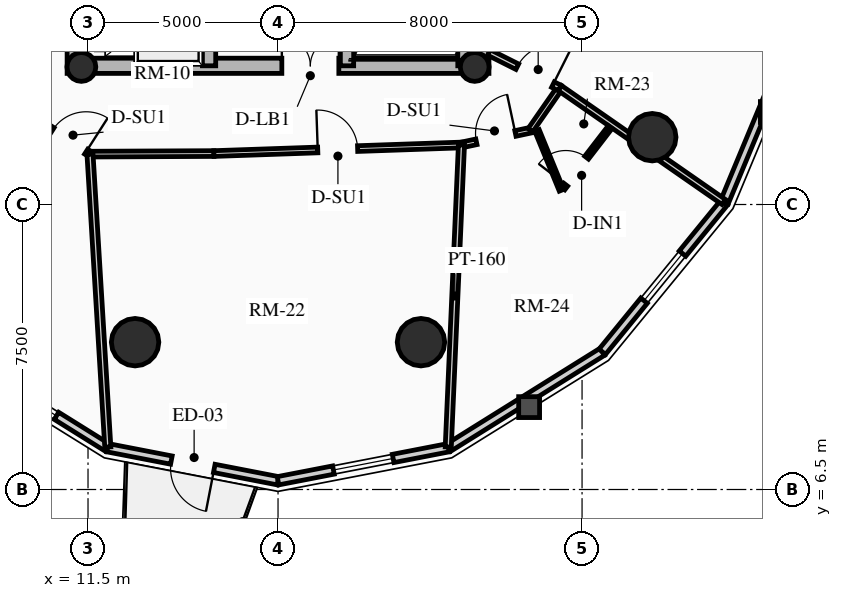
"""IFC4 building model, lengths in metres.
Left out: names, types, materials, properties, quantities, classifications, styles, units other than length and angle.
Written with IfcOpenShell. Run it as: python <this file> out.ifc"""

import sys

from ifc_helpers import new_model, si_unit, direction, frame, frame_2d, origin, origin_2d, place, context, subcontext, project, spatial, rectangle, circle, hollow_circle, extrude, source, transform, mapped, element, fill, save


model = new_model("IFC4")
c1 = context("Model", 3, precision=1e-05, world=origin(), true_north=direction((0.0, 1.0)))
c2 = subcontext(c1, "Body", "Model", "MODEL_VIEW")
j1 = project(units=[si_unit("LENGTHUNIT", "METRE"), si_unit("PLANEANGLEUNIT", "RADIAN")], contexts=[c1])
p1 = place(None, origin())
s1 = spatial("IfcSite", under=j1, at=p1, CompositionType="ELEMENT")
p2 = place(p1, origin())
s2 = spatial("IfcBuilding", under=s1, at=p2, CompositionType="ELEMENT")
p3 = place(p2, frame((0.0, 0.0, 154.51)))
s3 = spatial("IfcBuildingStorey", under=s2, at=p3, CompositionType="ELEMENT", Elevation=154.51)
for number, where, z_axis, x_axis in (
    (1, (11.15, 17.45, 0.0), (0.0, 0.0, 1.0), (0.0, 1.0, 0.0)),
    (2, (21.85, 17.45, 0.0), (0.0, 0.0, 1.0), (0.0, 1.0, 0.0)),
):
    element("IfcWall", number, at=place(p3, frame(where, z_axis=z_axis, x_axis=x_axis)), inside=s3, PredefinedType="SHEAR", context=c2, shape_type="SweptSolid", body=[
        extrude(rectangle(XDim=14.1, YDim=0.4, at=frame_2d((7.05, 0.0))), origin(), (0.0, 0.0, 1.0), 2.91),
    ])
p4 = place(p3, frame((11.15, 17.65, 0.0), z_axis=(0.0, 0.0, 1.0), x_axis=(1.0, 0.0, 0.0)))
e3 = element("IfcWall", 3, at=p4, inside=s3, PredefinedType="SHEAR", context=c2, shape_type="SweptSolid", body=[
    extrude(rectangle(XDim=10.7, YDim=0.4, at=frame_2d((5.35, 0.0))), origin(), (0.0, 0.0, 1.0), 2.91),
])
m1 = source(origin(), c2, "Body", "SweptSolid", [
    extrude(rectangle(XDim=1.5, YDim=2.02, at=frame_2d((0.75, 1.01))), frame((0.0, 0.21, 0.0), z_axis=(0.0, -1.0, 0.0), x_axis=(1.0, 0.0, 0.0)), (0.0, 0.0, 1.0), 0.42),
])
p5 = place(p4, frame((5.45, 0.0, 0.0)))
e4 = element("IfcOpeningElement", 4, at=p5, cuts=e3, PredefinedType="OPENING", context=c2, shape_type="MappedRepresentation", body=[
    mapped(m1, transform((0.0, 0.0, 0.0), x_axis=(1.0, 0.0, 0.0), y_axis=(0.0, 1.0, 0.0), z_axis=(0.0, 0.0, 1.0), scale=1.0)),
])
p6 = place(p3, frame((14.685, 17.65, 0.0), z_axis=(0.0, 0.0, 1.0), x_axis=(0.0, 1.0, 0.0)))
e5 = element("IfcWall", 5, at=p6, inside=s3, PredefinedType="SHEAR", context=c2, shape_type="SweptSolid", body=[
    extrude(rectangle(XDim=13.7, YDim=0.35, at=frame_2d((6.85, 0.0))), origin(), (0.0, 0.0, 1.0), 2.91),
])
m2 = source(origin(), c2, "Body", "SweptSolid", [
    extrude(rectangle(XDim=1.1, YDim=2.015, at=frame_2d((0.55, 1.007))), frame((0.0, 0.185, 0.0), z_axis=(0.0, -1.0, 0.0), x_axis=(1.0, 0.0, 0.0)), (0.0, 0.0, 1.0), 0.37),
])
p7 = place(p6, frame((4.85, 0.0, 0.0)))
e6 = element("IfcOpeningElement", 6, at=p7, cuts=e5, PredefinedType="OPENING", context=c2, shape_type="MappedRepresentation", body=[
    mapped(m2, transform((0.0, 0.0, 0.0), x_axis=(1.0, 0.0, 0.0), y_axis=(0.0, 1.0, 0.0), z_axis=(0.0, 0.0, 1.0), scale=1.0)),
])
p8 = place(p6, frame((0.625, 0.0, 0.0)))
e7 = element("IfcOpeningElement", 7, at=p8, cuts=e5, PredefinedType="OPENING", context=c2, shape_type="MappedRepresentation", body=[
    mapped(m2, transform((0.0, 0.0, 0.0), x_axis=(1.0, 0.0, 0.0), y_axis=(0.0, 1.0, 0.0), z_axis=(0.0, 0.0, 1.0), scale=1.0)),
])
p9 = place(p6, frame((2.625, 0.0, 0.0)))
e8 = element("IfcOpeningElement", 8, at=p9, cuts=e5, PredefinedType="OPENING", context=c2, shape_type="MappedRepresentation", body=[
    mapped(m2, transform((0.0, 0.0, 0.0), x_axis=(1.0, 0.0, 0.0), y_axis=(0.0, 1.0, 0.0), z_axis=(0.0, 0.0, 1.0), scale=1.0)),
])
m3 = source(origin(), c2, "Body", "SweptSolid", [
    extrude(rectangle(XDim=1.15, YDim=2.02, at=frame_2d((0.575, 1.01))), frame((0.0, 0.185, 0.0), z_axis=(0.0, -1.0, 0.0), x_axis=(1.0, 0.0, 0.0)), (0.0, 0.0, 1.0), 0.37),
])
p10 = place(p6, frame((7.27, 0.0, 0.0)))
e9 = element("IfcOpeningElement", 9, at=p10, cuts=e5, PredefinedType="OPENING", context=c2, shape_type="MappedRepresentation", body=[
    mapped(m3, transform((0.0, 0.0, 0.0), x_axis=(1.0, 0.0, 0.0), y_axis=(0.0, 1.0, 0.0), z_axis=(0.0, 0.0, 1.0), scale=1.0)),
])
p11 = place(p3, frame((18.315, 17.65, 0.0), z_axis=(0.0, 0.0, 1.0), x_axis=(0.0, 1.0, 0.0)))
e10 = element("IfcWall", 10, at=p11, inside=s3, PredefinedType="SHEAR", context=c2, shape_type="SweptSolid", body=[
    extrude(rectangle(XDim=9.6, YDim=0.35, at=frame_2d((4.8, 0.0))), origin(), (0.0, 0.0, 1.0), 2.91),
])
p12 = place(p11, frame((5.28, 0.0, 0.0)))
e11 = element("IfcOpeningElement", 11, at=p12, cuts=e10, PredefinedType="OPENING", context=c2, shape_type="MappedRepresentation", body=[
    mapped(m3, transform((0.0, 0.0, 0.0), x_axis=(1.0, 0.0, 0.0), y_axis=(0.0, 1.0, 0.0), z_axis=(0.0, 0.0, 1.0), scale=1.0)),
])
p13 = place(p3, frame((21.405, 17.65, 0.0), z_axis=(0.0, 0.0, 1.0), x_axis=(0.0, 1.0, 0.0)))
e12 = element("IfcWall", 12, at=p13, inside=s3, PredefinedType="SHEAR", context=c2, shape_type="SweptSolid", body=[
    extrude(rectangle(XDim=6.695, YDim=0.35, at=frame_2d((3.348, 0.0))), origin(), (0.0, 0.0, 1.0), 2.91),
])
for number, where, z_axis, x_axis in (
    (13, (11.325, 17.62, 0.0), (0.0, 0.0, 1.0), (1.0, 0.0, 0.0)),
    (14, (21.675, 17.62, 0.0), (0.0, 0.0, 1.0), (1.0, 0.0, 0.0)),
):
    element("IfcColumn", number, at=place(p3, frame(where, z_axis=z_axis, x_axis=x_axis)), inside=s3, PredefinedType="COLUMN", context=c2, shape_type="SweptSolid", body=[
        extrude(hollow_circle(Radius=0.38, WallThickness=0.032, at=origin_2d()), origin(), (0.0, 0.0, 1.0), 2.91),
    ])
for number, where, z_axis, x_axis in (
    (15, (12.739, 10.377, 0.0), (0.0, 0.0, 1.0), (1.0, 0.0, 0.0)),
    (16, (20.261, 10.377, 0.0), (0.0, 0.0, 1.0), (1.0, 0.0, 0.0)),
    (17, (26.347, 15.771, 0.0), (0.0, 0.0, 1.0), (1.0, 0.0, 0.0)),
):
    element("IfcColumn", number, at=place(p3, frame(where, z_axis=z_axis, x_axis=x_axis)), inside=s3, PredefinedType="USERDEFINED", context=c2, shape_type="SweptSolid", body=[
        extrude(circle(Radius=0.625, at=origin_2d()), origin(), (0.0, 0.0, 1.0), 2.91),
    ])
p14 = place(p3, frame((12.015, 7.6, 0.0), z_axis=(0.0, 0.0, 1.0), x_axis=(-0.848452391194, 0.529271707044, 0.0)))
e18 = element("IfcWall", 18, at=p14, inside=s3, PredefinedType="SOLIDWALL", context=c2, shape_type="SweptSolid", body=[
    extrude(rectangle(XDim=4.769, YDim=0.22, at=frame_2d((2.385, 0.0))), origin(), (0.0, 0.0, 1.0), 2.245),
])
m4 = source(origin(), c2, "Body", "SweptSolid", [
    extrude(rectangle(XDim=1.6, YDim=1.3, at=frame_2d((0.8, 0.65))), frame((0.0, 0.12, 0.0), z_axis=(0.0, -1.0, 0.0), x_axis=(1.0, 0.0, 0.0)), (0.0, 0.0, 1.0), 0.24),
])
p15 = place(p14, frame((1.585, 0.0, 0.65)))
e19 = element("IfcOpeningElement", 19, at=p15, cuts=e18, PredefinedType="OPENING", context=c2, shape_type="MappedRepresentation", body=[
    mapped(m4, transform((0.0, 0.0, 0.0), x_axis=(1.0, 0.0, 0.0), y_axis=(0.0, 1.0, 0.0), z_axis=(0.0, 0.0, 1.0), scale=1.0)),
])
p16 = place(p3, frame((16.5, 6.73, 0.0), z_axis=(0.0, 0.0, 1.0), x_axis=(-0.981718699963, 0.190337579429, 0.0)))
e20 = element("IfcWall", 20, at=p16, inside=s3, PredefinedType="SOLIDWALL", context=c2, shape_type="SweptSolid", body=[
    extrude(rectangle(XDim=4.569, YDim=0.22, at=frame_2d((2.284, 0.0))), origin(), (0.0, 0.0, 1.0), 2.245),
])
m5 = source(origin(), c2, "Body", "SweptSolid", [
    extrude(rectangle(XDim=1.15, YDim=2.005, at=frame_2d((0.575, 1.002))), frame((0.0, 0.12, 0.0), z_axis=(0.0, -1.0, 0.0), x_axis=(1.0, 0.0, 0.0)), (0.0, 0.0, 1.0), 0.24),
])
p17 = place(p16, frame((1.709, 0.0, 0.0)))
e21 = element("IfcOpeningElement", 21, at=p17, cuts=e20, PredefinedType="OPENING", context=c2, shape_type="MappedRepresentation", body=[
    mapped(m5, transform((0.0, 0.0, 0.0), x_axis=(1.0, 0.0, 0.0), y_axis=(0.0, 1.0, 0.0), z_axis=(0.0, 0.0, 1.0), scale=1.0)),
])
p18 = place(p3, frame((20.985, 7.6, 0.0), z_axis=(0.0, 0.0, 1.0), x_axis=(-0.981718699963, -0.190337579429, 0.0)))
e22 = element("IfcWall", 22, at=p18, inside=s3, PredefinedType="SOLIDWALL", context=c2, shape_type="SweptSolid", body=[
    extrude(rectangle(XDim=4.569, YDim=0.22, at=frame_2d((2.284, 0.0))), origin(), (0.0, 0.0, 1.0), 2.245),
])
p19 = place(p18, frame((1.484, 0.0, 0.65)))
e23 = element("IfcOpeningElement", 23, at=p19, cuts=e22, PredefinedType="OPENING", context=c2, shape_type="MappedRepresentation", body=[
    mapped(m4, transform((0.0, 0.0, 0.0), x_axis=(1.0, 0.0, 0.0), y_axis=(0.0, 1.0, 0.0), z_axis=(0.0, 0.0, 1.0), scale=1.0)),
])
p20 = place(p3, frame((25.032, 10.124, 0.0), z_axis=(0.0, 0.0, 1.0), x_axis=(-0.848452391194, -0.529271707044, 0.0)))
e24 = element("IfcWall", 24, at=p20, inside=s3, PredefinedType="SOLIDWALL", context=c2, shape_type="SweptSolid", body=[
    extrude(rectangle(XDim=4.769, YDim=0.22, at=frame_2d((2.385, 0.0))), origin(), (0.0, 0.0, 1.0), 2.245),
])
p21 = place(p3, frame((28.243, 14.055, 0.0), z_axis=(0.0, 0.0, 1.0), x_axis=(-0.632598524901, -0.774479894053, 0.0)))
e25 = element("IfcWall", 25, at=p21, inside=s3, PredefinedType="SOLIDWALL", context=c2, shape_type="SweptSolid", body=[
    extrude(rectangle(XDim=5.076, YDim=0.22, at=frame_2d((2.538, 0.0))), origin(), (0.0, 0.0, 1.0), 2.245),
])
p22 = place(p21, frame((1.738, 0.0, 0.65)))
e26 = element("IfcOpeningElement", 26, at=p22, cuts=e25, PredefinedType="OPENING", context=c2, shape_type="MappedRepresentation", body=[
    mapped(m4, transform((0.0, 0.0, 0.0), x_axis=(1.0, 0.0, 0.0), y_axis=(0.0, 1.0, 0.0), z_axis=(0.0, 0.0, 1.0), scale=1.0)),
])
p23 = place(p3, frame((30.305, 19.009, 0.0), z_axis=(0.0, 0.0, 1.0), x_axis=(-0.384259959969, -0.923224936386, 0.0)))
e27 = element("IfcWall", 27, at=p23, inside=s3, PredefinedType="SOLIDWALL", context=c2, shape_type="SweptSolid", body=[
    extrude(rectangle(XDim=5.365, YDim=0.22, at=frame_2d((2.683, 0.0))), origin(), (0.0, 0.0, 1.0), 2.245),
])
p24 = place(p3, frame((10.237, 16.168, 0.0), z_axis=(0.0, 0.0, 1.0), x_axis=(0.842061223587, -0.53938195718, 0.0)))
e28 = element("IfcWall", 28, at=p24, inside=s3, PredefinedType="PARTITIONING", context=c2, shape_type="SweptSolid", body=[
    extrude(rectangle(XDim=1.562, YDim=0.15, at=frame_2d((0.781, 0.0))), origin(), (0.0, 0.0, 1.0), 2.245),
])
m6 = source(origin(), c2, "Body", "SweptSolid", [
    extrude(rectangle(XDim=1.05, YDim=2.015, at=frame_2d((0.525, 1.007))), frame((0.0, 0.085, 0.0), z_axis=(0.0, -1.0, 0.0), x_axis=(1.0, 0.0, 0.0)), (0.0, 0.0, 1.0), 0.17),
])
p25 = place(p24, frame((0.392, 0.0, 0.0)))
e29 = element("IfcOpeningElement", 29, at=p25, cuts=e28, PredefinedType="OPENING", context=c2, shape_type="MappedRepresentation", body=[
    mapped(m6, transform((0.0, 0.0, 0.0), x_axis=(1.0, 0.0, 0.0), y_axis=(0.0, 1.0, 0.0), z_axis=(0.0, 0.0, 1.0), scale=1.0)),
])
p26 = place(p3, frame((11.552, 15.326, 0.0), z_axis=(0.0, 0.0, 1.0), x_axis=(0.999989573465, 0.004566504266, 0.0)))
e30 = element("IfcWall", 30, at=p26, inside=s3, PredefinedType="PARTITIONING", context=c2, shape_type="SweptSolid", body=[
    extrude(rectangle(XDim=3.261, YDim=0.15, at=frame_2d((1.631, 0.0))), origin(), (0.0, 0.0, 1.0), 2.245),
])
p27 = place(p3, frame((14.813, 15.341, 0.0), z_axis=(0.0, 0.0, 1.0), x_axis=(0.999402077819, 0.034575813105, 0.0)))
e31 = element("IfcWall", 31, at=p27, inside=s3, PredefinedType="PARTITIONING", context=c2, shape_type="SweptSolid", body=[
    extrude(rectangle(XDim=6.517, YDim=0.15, at=frame_2d((3.259, 0.0))), origin(), (0.0, 0.0, 1.0), 2.245),
])
p28 = place(p27, frame((2.734, 0.0, 0.0)))
e32 = element("IfcOpeningElement", 32, at=p28, cuts=e31, PredefinedType="OPENING", context=c2, shape_type="MappedRepresentation", body=[
    mapped(m6, transform((0.0, 0.0, 0.0), x_axis=(1.0, 0.0, 0.0), y_axis=(0.0, 1.0, 0.0), z_axis=(0.0, 0.0, 1.0), scale=1.0)),
])
p29 = place(p3, frame((21.326, 15.566, 0.0), z_axis=(0.0, 0.0, 1.0), x_axis=(0.977908238308, 0.209034632176, 0.0)))
e33 = element("IfcWall", 33, at=p29, inside=s3, PredefinedType="PARTITIONING", context=c2, shape_type="SweptSolid", body=[
    extrude(rectangle(XDim=1.855, YDim=0.15, at=frame_2d((0.927, 0.0))), origin(), (0.0, 0.0, 1.0), 2.245),
])
p30 = place(p29, frame((0.402, 0.0, 0.0)))
e34 = element("IfcOpeningElement", 34, at=p30, cuts=e33, PredefinedType="OPENING", context=c2, shape_type="MappedRepresentation", body=[
    mapped(m6, transform((0.0, 0.0, 0.0), x_axis=(1.0, 0.0, 0.0), y_axis=(0.0, 1.0, 0.0), z_axis=(0.0, 0.0, 1.0), scale=1.0)),
])
p31 = place(p3, frame((23.14, 15.954, 0.0), z_axis=(0.0, 0.0, 1.0), x_axis=(0.570699895117, 0.821158711647, 0.0)))
e35 = element("IfcWall", 35, at=p31, inside=s3, PredefinedType="PARTITIONING", context=c2, shape_type="SweptSolid", body=[
    extrude(rectangle(XDim=1.354, YDim=0.15, at=frame_2d((0.677, 0.0))), origin(), (0.0, 0.0, 1.0), 2.245),
])
p32 = place(p3, frame((11.552, 15.326, 0.0), z_axis=(0.0, 0.0, 1.0), x_axis=(0.060740403573, -0.998153597085, 0.0)))
e36 = element("IfcWall", 36, at=p32, inside=s3, PredefinedType="PARTITIONING", context=c2, shape_type="SweptSolid", body=[
    extrude(rectangle(XDim=7.721, YDim=0.16, at=frame_2d((3.861, 0.0))), origin(), (0.0, 0.0, 1.0), 2.245),
])
p33 = place(p3, frame((21.326, 15.566, 0.0), z_axis=(0.0, 0.0, 1.0), x_axis=(-0.043642330618, -0.999047219594, 0.0)))
e37 = element("IfcWall", 37, at=p33, inside=s3, PredefinedType="PARTITIONING", context=c2, shape_type="SweptSolid", body=[
    extrude(rectangle(XDim=7.955, YDim=0.16, at=frame_2d((3.978, 0.0))), origin(), (0.0, 0.0, 1.0), 2.245),
])
p34 = place(p3, frame((23.913, 17.065, 0.0), z_axis=(0.0, 0.0, 1.0), x_axis=(0.821126775727, -0.570745843773, 0.0)))
e38 = element("IfcWall", 38, at=p34, inside=s3, PredefinedType="PARTITIONING", context=c2, shape_type="SweptSolid", body=[
    extrude(rectangle(XDim=5.254, YDim=0.16, at=frame_2d((2.627, 0.0))), origin(), (0.0, 0.0, 1.0), 2.245),
])
p35 = place(p3, frame((22.05, 18.0, 0.0), z_axis=(0.0, 0.0, 1.0), x_axis=(0.893817206679, -0.448431489799, 0.0)))
e39 = element("IfcWall", 39, at=p35, inside=s3, PredefinedType="PARTITIONING", context=c2, shape_type="SweptSolid", body=[
    extrude(rectangle(XDim=2.084, YDim=0.16, at=frame_2d((1.042, 0.0))), origin(), (0.0, 0.0, 1.0), 2.245),
])
m7 = source(origin(), c2, "Body", "SweptSolid", [
    extrude(rectangle(XDim=1.05, YDim=2.015, at=frame_2d((0.525, 1.007))), frame((0.0, 0.09, 0.0), z_axis=(0.0, -1.0, 0.0), x_axis=(1.0, 0.0, 0.0)), (0.0, 0.0, 1.0), 0.18),
])
p36 = place(p35, frame((0.834, 0.0, 0.0)))
e40 = element("IfcOpeningElement", 40, at=p36, cuts=e39, PredefinedType="OPENING", context=c2, shape_type="MappedRepresentation", body=[
    mapped(m7, transform((0.0, 0.0, 0.0), x_axis=(1.0, 0.0, 0.0), y_axis=(0.0, 1.0, 0.0), z_axis=(0.0, 0.0, 1.0), scale=1.0)),
])
p37 = place(p3, frame((23.315, 15.947, 0.0), z_axis=(0.0, 0.0, 1.0), x_axis=(0.37920929394, -0.925310926873, 0.0)))
e41 = element("IfcWall", 41, at=p37, inside=s3, PredefinedType="PARTITIONING", context=c2, shape_type="SweptSolid", body=[
    extrude(rectangle(XDim=1.698, YDim=0.125, at=frame_2d((0.849, 0.0))), origin(), (0.0, 0.0, 1.0), 2.675),
])
p38 = place(p3, frame((23.998, 14.425, 0.0), z_axis=(0.0, 0.0, 1.0), x_axis=(0.610534539262, 0.791989631478, 0.0)))
e42 = element("IfcWall", 42, at=p38, inside=s3, PredefinedType="PARTITIONING", context=c2, shape_type="SweptSolid", body=[
    extrude(rectangle(XDim=2.033, YDim=0.125, at=frame_2d((1.017, 0.0))), origin(), (0.0, 0.0, 1.0), 2.675),
])
m8 = source(origin(), c2, "Body", "SweptSolid", [
    extrude(rectangle(XDim=0.9, YDim=2.005, at=frame_2d((0.45, 1.002))), frame((0.0, 0.073, 0.0), z_axis=(0.0, -1.0, 0.0), x_axis=(1.0, 0.0, 0.0)), (0.0, 0.0, 1.0), 0.145),
])
p39 = place(p38, frame((0.12, 0.0, 0.0)))
e43 = element("IfcOpeningElement", 43, at=p39, cuts=e42, PredefinedType="OPENING", context=c2, shape_type="MappedRepresentation", body=[
    mapped(m8, transform((0.0, 0.0, 0.0), x_axis=(1.0, 0.0, 0.0), y_axis=(0.0, 1.0, 0.0), z_axis=(0.0, 0.0, 1.0), scale=1.0)),
])
m9 = source(origin(), c2, "Body", "SweptSolid", [
    extrude(rectangle(XDim=1.6, YDim=1.3, at=frame_2d((0.8, 0.65))), frame((0.0, 0.03, 0.0), z_axis=(0.0, -1.0, 0.0), x_axis=(1.0, 0.0, 0.0)), (0.0, 0.0, 1.0), 0.06),
])
p40 = place(p15, origin())
e44 = element("IfcWindow", 44, at=p40, inside=s3, PartitioningType="SINGLE_PANEL", PredefinedType="WINDOW", context=c2, shape_type="MappedRepresentation", body=[
    mapped(m9, transform((0.0, 0.0, 0.0), x_axis=(1.0, 0.0, 0.0), y_axis=(0.0, 1.0, 0.0), z_axis=(0.0, 0.0, 1.0), scale=1.0)),
])
fill(e19, e44)
m10 = source(origin(), c2, "Body", "SweptSolid", [
    extrude(rectangle(XDim=1.15, YDim=2.005, at=frame_2d((0.575, 1.002))), frame((0.0, 0.025, 0.0), z_axis=(0.0, -1.0, 0.0), x_axis=(1.0, 0.0, 0.0)), (0.0, 0.0, 1.0), 0.05),
])
p41 = place(p17, origin())
e45 = element("IfcDoor", 45, at=p41, inside=s3, OperationType="SINGLE_SWING_LEFT", PredefinedType="DOOR", context=c2, shape_type="MappedRepresentation", body=[
    mapped(m10, transform((0.0, 0.0, 0.0), x_axis=(1.0, 0.0, 0.0), y_axis=(0.0, 1.0, 0.0), z_axis=(0.0, 0.0, 1.0), scale=1.0)),
])
fill(e21, e45)
p42 = place(p19, origin())
e46 = element("IfcWindow", 46, at=p42, inside=s3, PartitioningType="SINGLE_PANEL", PredefinedType="WINDOW", context=c2, shape_type="MappedRepresentation", body=[
    mapped(m9, transform((0.0, 0.0, 0.0), x_axis=(1.0, 0.0, 0.0), y_axis=(0.0, 1.0, 0.0), z_axis=(0.0, 0.0, 1.0), scale=1.0)),
])
fill(e23, e46)
p43 = place(p22, origin())
e47 = element("IfcWindow", 47, at=p43, inside=s3, PartitioningType="SINGLE_PANEL", PredefinedType="WINDOW", context=c2, shape_type="MappedRepresentation", body=[
    mapped(m9, transform((0.0, 0.0, 0.0), x_axis=(1.0, 0.0, 0.0), y_axis=(0.0, 1.0, 0.0), z_axis=(0.0, 0.0, 1.0), scale=1.0)),
])
fill(e26, e47)
m11 = source(origin(), c2, "Body", "SweptSolid", [
    extrude(rectangle(XDim=1.5, YDim=2.02, at=frame_2d((0.75, 1.01))), frame((0.0, 0.025, 0.0), z_axis=(0.0, -1.0, 0.0), x_axis=(1.0, 0.0, 0.0)), (0.0, 0.0, 1.0), 0.05),
])
p44 = place(p5, origin())
e48 = element("IfcDoor", 48, at=p44, inside=s3, OperationType="DOUBLE_DOOR_SINGLE_SWING", PredefinedType="DOOR", context=c2, shape_type="MappedRepresentation", body=[
    mapped(m11, transform((0.0, 0.0, 0.0), x_axis=(1.0, 0.0, 0.0), y_axis=(0.0, 1.0, 0.0), z_axis=(0.0, 0.0, 1.0), scale=1.0)),
])
fill(e4, e48)
m12 = source(origin(), c2, "Body", "SweptSolid", [
    extrude(rectangle(XDim=1.05, YDim=2.015, at=frame_2d((0.525, 1.007))), frame((0.0, 0.025, 0.0), z_axis=(0.0, -1.0, 0.0), x_axis=(1.0, 0.0, 0.0)), (0.0, 0.0, 1.0), 0.05),
])
p45 = place(p36, origin())
e49 = element("IfcDoor", 49, at=p45, inside=s3, OperationType="SINGLE_SWING_RIGHT", PredefinedType="DOOR", context=c2, shape_type="MappedRepresentation", body=[
    mapped(m12, transform((0.0, 0.0, 0.0), x_axis=(1.0, 0.0, 0.0), y_axis=(0.0, 1.0, 0.0), z_axis=(0.0, 0.0, 1.0), scale=1.0)),
])
fill(e40, e49)
p46 = place(p25, origin())
e50 = element("IfcDoor", 50, at=p46, inside=s3, OperationType="SINGLE_SWING_RIGHT", PredefinedType="DOOR", context=c2, shape_type="MappedRepresentation", body=[
    mapped(m12, transform((0.0, 0.0, 0.0), x_axis=(1.0, 0.0, 0.0), y_axis=(0.0, 1.0, 0.0), z_axis=(0.0, 0.0, 1.0), scale=1.0)),
])
fill(e29, e50)
p47 = place(p28, origin())
e51 = element("IfcDoor", 51, at=p47, inside=s3, OperationType="SINGLE_SWING_LEFT", PredefinedType="DOOR", context=c2, shape_type="MappedRepresentation", body=[
    mapped(m12, transform((0.0, 0.0, 0.0), x_axis=(1.0, 0.0, 0.0), y_axis=(0.0, 1.0, 0.0), z_axis=(0.0, 0.0, 1.0), scale=1.0)),
])
fill(e32, e51)
p48 = place(p30, origin())
e52 = element("IfcDoor", 52, at=p48, inside=s3, OperationType="SINGLE_SWING_RIGHT", PredefinedType="DOOR", context=c2, shape_type="MappedRepresentation", body=[
    mapped(m12, transform((0.0, 0.0, 0.0), x_axis=(1.0, 0.0, 0.0), y_axis=(0.0, 1.0, 0.0), z_axis=(0.0, 0.0, 1.0), scale=1.0)),
])
fill(e34, e52)
m13 = source(origin(), c2, "Body", "SweptSolid", [
    extrude(rectangle(XDim=0.9, YDim=2.005, at=frame_2d((0.45, 1.002))), frame((0.0, 0.025, 0.0), z_axis=(0.0, -1.0, 0.0), x_axis=(1.0, 0.0, 0.0)), (0.0, 0.0, 1.0), 0.05),
])
p49 = place(p39, origin())
e53 = element("IfcDoor", 53, at=p49, inside=s3, OperationType="SINGLE_SWING_LEFT", PredefinedType="DOOR", context=c2, shape_type="MappedRepresentation", body=[
    mapped(m13, transform((0.0, 0.0, 0.0), x_axis=(1.0, 0.0, 0.0), y_axis=(0.0, 1.0, 0.0), z_axis=(0.0, 0.0, 1.0), scale=1.0)),
])
fill(e43, e53)
save(model, sys.argv[1])
